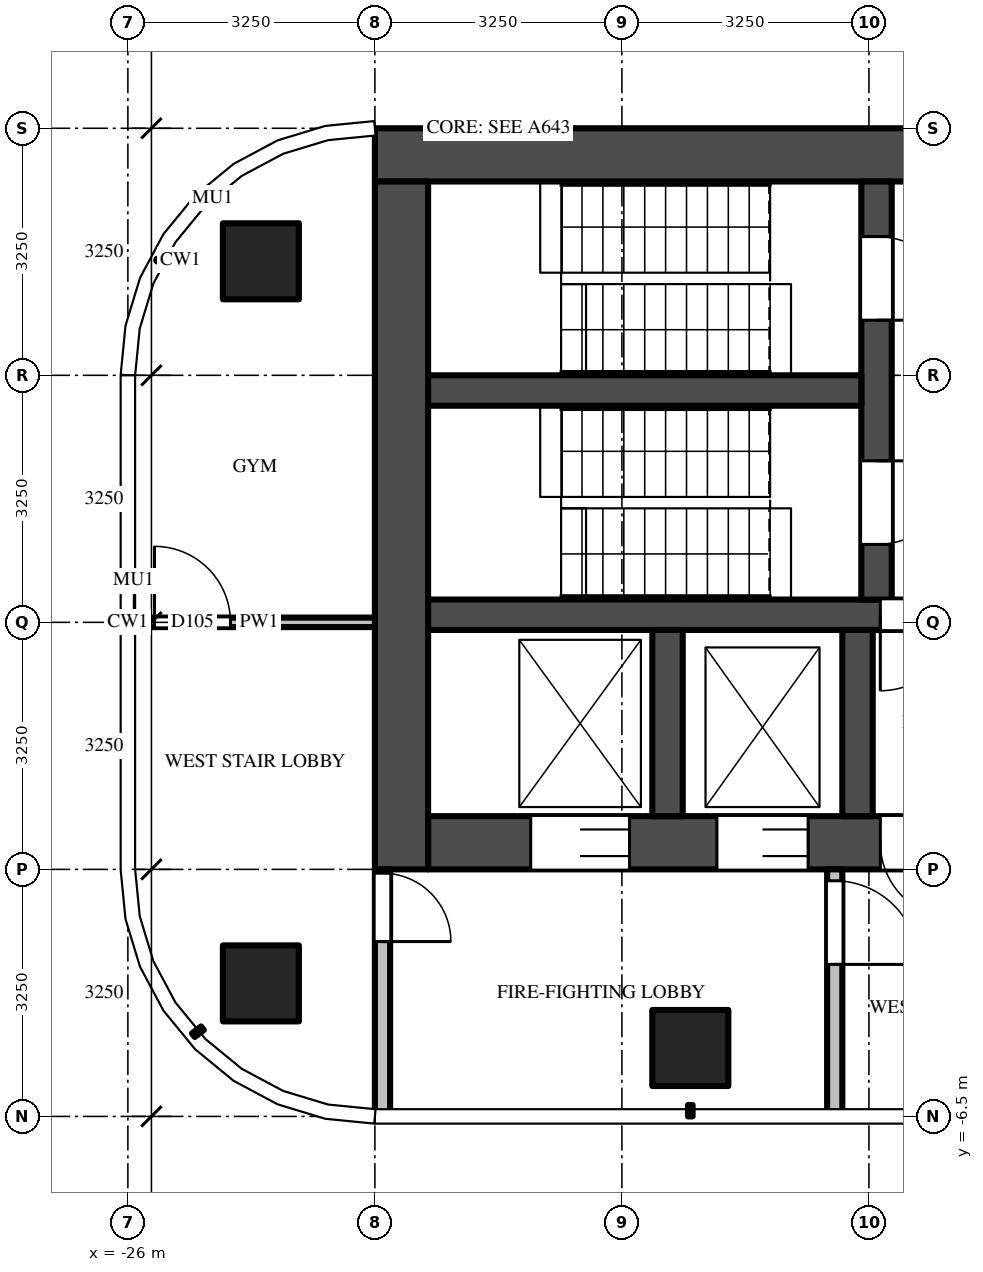
"""IFC4 building model, lengths in metres.
Left out: names, types, materials, properties, quantities, classifications, styles, units other than length and angle.
Written with IfcOpenShell. Run it as: python <this file> out.ifc"""

import sys

from ifc_helpers import new_model, si_unit, direction, frame, frame_2d, origin, origin_2d, place, context, subcontext, project, spatial, polyline, rectangle, outline, extrude, source, transform, mapped, element, fill, save


model = new_model("IFC4")
c1 = context("Model", 3, precision=1e-05, world=origin(), true_north=direction((0.0, 1.0)))
c2 = subcontext(c1, "Body", "Model", "MODEL_VIEW")
j1 = project(units=[si_unit("LENGTHUNIT", "METRE"), si_unit("PLANEANGLEUNIT", "RADIAN")], contexts=[c1])
p1 = place(None, origin())
s1 = spatial("IfcSite", under=j1, at=p1, CompositionType="ELEMENT")
p2 = place(p1, origin())
s2 = spatial("IfcBuilding", under=s1, at=p2, CompositionType="ELEMENT")
p3 = place(p2, frame((0.0, 0.0, 326.2)))
s3 = spatial("IfcBuildingStorey", under=s2, at=p3, CompositionType="ELEMENT", Elevation=326.2)
m1 = source(origin(), c2, "Body", "SweptSolid", [
    extrude(rectangle(XDim=1.0, YDim=1.0, at=origin_2d()), origin(), (0.0, 0.0, 1.0), 3.9),
])
for number, where, z_axis, x_axis in (
    (1, (-18.6, -5.6, 0.0), (0.0, 0.0, 1.0), (1.0, 0.0, 0.0)),
    (2, (-24.25, -4.75, 0.0), (0.0, 0.0, 1.0), (1.0, 0.0, 0.0)),
    (3, (-24.25, 4.75, 0.0), (0.0, 0.0, 1.0), (1.0, 0.0, 0.0)),
):
    element("IfcColumn", number, at=place(p3, frame(where, z_axis=z_axis, x_axis=x_axis)), inside=s3, PredefinedType="COLUMN", context=c2, shape_type="MappedRepresentation", body=[
        mapped(m1, transform((0.0, 0.0, 0.0))),
    ])
m2 = source(origin(), c2, "Body", "SweptSolid", [
    extrude(rectangle(XDim=16.65, YDim=0.7, at=frame_2d((8.325, 0.0))), origin(), (0.0, 0.0, 1.0), 3.5),
])
p4 = place(p3, frame((-6.1, 6.15, 0.0), z_axis=(0.0, 0.0, 1.0), x_axis=(-1.0, 0.0, 0.0)))
e4 = element("IfcWall", 4, at=p4, inside=s3, PredefinedType="SHEAR", context=c2, shape_type="MappedRepresentation", body=[
    mapped(m2, transform((0.0, 0.0, 0.0))),
])
m3 = source(origin(), c2, "Body", "SweptSolid", [
    extrude(rectangle(XDim=14.85, YDim=0.7, at=frame_2d((7.425, 0.0))), origin(), (0.0, 0.0, 1.0), 3.5),
])
p5 = place(p3, frame((-7.2, -2.9, 0.0), z_axis=(0.0, 0.0, 1.0), x_axis=(-1.0, 0.0, 0.0)))
e5 = element("IfcWall", 5, at=p5, inside=s3, PredefinedType="SHEAR", context=c2, shape_type="MappedRepresentation", body=[
    mapped(m3, transform((0.0, 0.0, 0.0))),
])
m4 = source(origin(), c2, "Body", "SweptSolid", [
    extrude(rectangle(XDim=1.2, YDim=2.1, at=frame_2d((0.6, 1.05))), frame((0.0, 0.36, 0.0), z_axis=(0.0, -1.0, 0.0), x_axis=(1.0, 0.0, 0.0)), (0.0, 0.0, 1.0), 0.72),
])
p6 = place(p5, frame((5.7, 0.0, 0.0)))
e6 = element("IfcOpeningElement", 6, at=p6, cuts=e5, PredefinedType="OPENING", context=c2, shape_type="MappedRepresentation", body=[
    mapped(m4, transform((0.0, 0.0, 0.0))),
])
m5 = source(origin(), c2, "Body", "SweptSolid", [
    extrude(rectangle(XDim=1.3, YDim=2.1, at=frame_2d((0.65, 1.05))), frame((0.0, 0.36, 0.0), z_axis=(0.0, -1.0, 0.0), x_axis=(1.0, 0.0, 0.0)), (0.0, 0.0, 1.0), 0.72),
])
p7 = place(p5, frame((12.2, 0.0, 0.0)))
e7 = element("IfcOpeningElement", 7, at=p7, cuts=e5, PredefinedType="OPENING", context=c2, shape_type="MappedRepresentation", body=[
    mapped(m5, transform((0.0, 0.0, 0.0))),
])
p8 = place(p5, frame((9.85, 0.0, 0.0)))
e8 = element("IfcOpeningElement", 8, at=p8, cuts=e5, PredefinedType="OPENING", context=c2, shape_type="MappedRepresentation", body=[
    mapped(m4, transform((0.0, 0.0, 0.0))),
])
m6 = source(origin(), c2, "Body", "SweptSolid", [
    extrude(rectangle(XDim=1.0, YDim=2.1, at=frame_2d((0.5, 1.05))), frame((0.0, 0.36, 0.0), z_axis=(0.0, -1.0, 0.0), x_axis=(1.0, 0.0, 0.0)), (0.0, 0.0, 1.0), 0.72),
])
p9 = place(p5, frame((7.9, 0.0, 0.0)))
e9 = element("IfcOpeningElement", 9, at=p9, cuts=e5, PredefinedType="OPENING", context=c2, shape_type="MappedRepresentation", body=[
    mapped(m6, transform((0.0, 0.0, 0.0))),
])
p10 = place(p5, frame((1.212, 0.0, 0.0)))
e10 = element("IfcOpeningElement", 10, at=p10, cuts=e5, PredefinedType="OPENING", context=c2, shape_type="MappedRepresentation", body=[
    mapped(m6, transform((0.0, 0.0, 0.0))),
])
m7 = source(origin(), c2, "Body", "SweptSolid", [
    extrude(rectangle(XDim=0.8, YDim=2.1, at=frame_2d((0.4, 1.05))), frame((0.0, 0.36, 0.0), z_axis=(0.0, -1.0, 0.0), x_axis=(1.0, 0.0, 0.0)), (0.0, 0.0, 1.0), 0.72),
])
p11 = place(p5, frame((3.788, 0.0, 0.0)))
e11 = element("IfcOpeningElement", 11, at=p11, cuts=e5, PredefinedType="OPENING", context=c2, shape_type="MappedRepresentation", body=[
    mapped(m7, transform((0.0, 0.0, 0.0))),
])
m8 = source(origin(), c2, "Body", "SweptSolid", [
    extrude(rectangle(XDim=9.05, YDim=0.7, at=frame_2d((4.525, 0.0))), origin(), (0.0, 0.0, 1.0), 3.5),
])
p12 = place(p3, frame((-22.4, 5.8, 0.0), z_axis=(0.0, 0.0, 1.0), x_axis=(0.0, -1.0, 0.0)))
e12 = element("IfcWall", 12, at=p12, inside=s3, PredefinedType="SHEAR", context=c2, shape_type="MappedRepresentation", body=[
    mapped(m8, transform((0.0, 0.0, 0.0))),
])
m9 = source(origin(), c2, "Body", "SweptSolid", [
    extrude(rectangle(XDim=14.85, YDim=0.4, at=frame_2d((7.425, 0.0))), origin(), (0.0, 0.0, 1.0), 3.5),
])
p13 = place(p3, frame((-7.2, 0.1, 0.0), z_axis=(0.0, 0.0, 1.0), x_axis=(-1.0, 0.0, 0.0)))
e13 = element("IfcWall", 13, at=p13, inside=s3, PredefinedType="SHEAR", context=c2, shape_type="MappedRepresentation", body=[
    mapped(m9, transform((0.0, 0.0, 0.0))),
])
m10 = source(origin(), c2, "Body", "SweptSolid", [
    extrude(rectangle(XDim=1.0, YDim=2.1, at=frame_2d((0.5, 1.05))), frame((0.0, 0.21, 0.0), z_axis=(0.0, -1.0, 0.0), x_axis=(1.0, 0.0, 0.0)), (0.0, 0.0, 1.0), 0.42),
])
p14 = place(p13, frame((7.9, 0.0, 0.0)))
e14 = element("IfcOpeningElement", 14, at=p14, cuts=e13, PredefinedType="OPENING", context=c2, shape_type="MappedRepresentation", body=[
    mapped(m10, transform((0.0, 0.0, 0.0))),
])
m11 = source(origin(), c2, "Body", "SweptSolid", [
    extrude(rectangle(XDim=5.5, YDim=0.4, at=frame_2d((2.75, 0.0))), origin(), (0.0, 0.0, 1.0), 3.5),
])
p15 = place(p3, frame((-16.15, 5.8, 0.0), z_axis=(0.0, 0.0, 1.0), x_axis=(0.0, -1.0, 0.0)))
e15 = element("IfcWall", 15, at=p15, inside=s3, PredefinedType="SHEAR", context=c2, shape_type="MappedRepresentation", body=[
    mapped(m11, transform((0.0, 0.0, 0.0))),
])
m12 = source(origin(), c2, "Body", "SweptSolid", [
    extrude(rectangle(XDim=1.1, YDim=2.1, at=frame_2d((0.55, 1.05))), frame((0.0, 0.21, 0.0), z_axis=(0.0, -1.0, 0.0), x_axis=(1.0, 0.0, 0.0)), (0.0, 0.0, 1.0), 0.42),
])
p16 = place(p15, frame((0.725, 0.0, 0.0)))
e16 = element("IfcOpeningElement", 16, at=p16, cuts=e15, PredefinedType="OPENING", context=c2, shape_type="MappedRepresentation", body=[
    mapped(m12, transform((0.0, 0.0, 0.0))),
])
p17 = place(p15, frame((3.675, 0.0, 0.0)))
e17 = element("IfcOpeningElement", 17, at=p17, cuts=e15, PredefinedType="OPENING", context=c2, shape_type="MappedRepresentation", body=[
    mapped(m12, transform((0.0, 0.0, 0.0))),
])
m13 = source(origin(), c2, "Body", "SweptSolid", [
    extrude(rectangle(XDim=5.7, YDim=0.4, at=frame_2d((2.85, 0.0))), origin(), (0.0, 0.0, 1.0), 3.5),
])
p18 = place(p3, frame((-16.35, 3.05, 0.0), z_axis=(0.0, 0.0, 1.0), x_axis=(-1.0, 0.0, 0.0)))
e18 = element("IfcWall", 18, at=p18, inside=s3, PredefinedType="SHEAR", context=c2, shape_type="MappedRepresentation", body=[
    mapped(m13, transform((0.0, 0.0, 0.0))),
])
m14 = source(origin(), c2, "Body", "SweptSolid", [
    extrude(rectangle(XDim=2.45, YDim=0.4, at=frame_2d((1.225, 0.0))), origin(), (0.0, 0.0, 1.0), 3.5),
])
for number, where, z_axis, x_axis in (
    (19, (-16.4, -0.1, 0.0), (0.0, 0.0, 1.0), (0.0, -1.0, 0.0)),
    (20, (-18.9, -0.1, 0.0), (0.0, 0.0, 1.0), (0.0, -1.0, 0.0)),
):
    element("IfcWall", number, at=place(p3, frame(where, z_axis=z_axis, x_axis=x_axis)), inside=s3, PredefinedType="SHEAR", context=c2, shape_type="MappedRepresentation", body=[
        mapped(m14, transform((0.0, 0.0, 0.0))),
    ])
m15 = source(origin(), c2, "Body", "SweptSolid", [
    extrude(rectangle(XDim=3.25, YDim=0.2, at=frame_2d((1.625, 0.0))), origin(), (0.0, 0.0, 1.0), 3.5),
])
p19 = place(p3, frame((-16.7, -3.25, 0.0), z_axis=(0.0, 0.0, 1.0), x_axis=(0.0, -1.0, 0.0)))
e21 = element("IfcWall", 21, at=p19, inside=s3, PredefinedType="PARTITIONING", context=c2, shape_type="MappedRepresentation", body=[
    mapped(m15, transform((0.0, 0.0, 0.0))),
])
m16 = source(origin(), c2, "Body", "SweptSolid", [
    extrude(rectangle(XDim=1.1, YDim=2.1, at=frame_2d((0.55, 1.05))), frame((0.0, 0.11, 0.0), z_axis=(0.0, -1.0, 0.0), x_axis=(1.0, 0.0, 0.0)), (0.0, 0.0, 1.0), 0.22),
])
p20 = place(p19, frame((0.15, 0.0, 0.0)))
e22 = element("IfcOpeningElement", 22, at=p20, cuts=e21, PredefinedType="OPENING", context=c2, shape_type="MappedRepresentation", body=[
    mapped(m16, transform((0.0, 0.0, 0.0))),
])
p21 = place(p3, frame((-22.65, -3.25, 0.0), z_axis=(0.0, 0.0, 1.0), x_axis=(0.0, -1.0, 0.0)))
e23 = element("IfcWall", 23, at=p21, inside=s3, PredefinedType="PARTITIONING", context=c2, shape_type="MappedRepresentation", body=[
    mapped(m15, transform((0.0, 0.0, 0.0))),
])
m17 = source(origin(), c2, "Body", "SweptSolid", [
    extrude(rectangle(XDim=0.9, YDim=2.1, at=frame_2d((0.45, 1.05))), frame((0.0, 0.11, 0.0), z_axis=(0.0, -1.0, 0.0), x_axis=(1.0, 0.0, 0.0)), (0.0, 0.0, 1.0), 0.22),
])
p22 = place(p21, frame((0.05, 0.0, 0.0)))
e24 = element("IfcOpeningElement", 24, at=p22, cuts=e23, PredefinedType="OPENING", context=c2, shape_type="MappedRepresentation", body=[
    mapped(m17, transform((0.0, 0.0, 0.0))),
])
p23 = place(p3, origin())
e25 = element("IfcWall", 25, at=p23, inside=s3, PredefinedType="USERDEFINED", context=c2, shape_type="SweptSolid", body=[
    extrude(outline(polyline([(-25.364, -8.208), (-26.259, -7.39), (-25.854, -6.948), (-25.053, -7.68), (-23.654, -8.147), (-22.852, -8.101), (-22.817, -8.699), (-23.734, -8.753), (-25.364, -8.208)])), origin(), (0.0, 0.0, 1.0), 0.5),
])
m18 = source(origin(), c2, "Body", "SweptSolid", [
    extrude(rectangle(XDim=3.05, YDim=0.125, at=frame_2d((1.525, 0.0))), origin(), (0.0, 0.0, 1.0), 2.58),
])
p24 = place(p3, frame((-25.8, 0.0, 0.0), z_axis=(0.0, 0.0, 1.0), x_axis=(1.0, 0.0, 0.0)))
e26 = element("IfcWall", 26, at=p24, inside=s3, PredefinedType="PARTITIONING", context=c2, shape_type="MappedRepresentation", body=[
    mapped(m18, transform((0.0, 0.0, 0.0))),
])
m19 = source(origin(), c2, "Body", "SweptSolid", [
    extrude(rectangle(XDim=1.0, YDim=2.1, at=frame_2d((0.5, 1.05))), frame((0.0, 0.073, 0.0), z_axis=(0.0, -1.0, 0.0), x_axis=(1.0, 0.0, 0.0)), (0.0, 0.0, 1.0), 0.145),
])
p25 = place(p24, frame((0.15, 0.0, 0.0)))
e27 = element("IfcOpeningElement", 27, at=p25, cuts=e26, PredefinedType="OPENING", context=c2, shape_type="MappedRepresentation", body=[
    mapped(m19, transform((0.0, 0.0, 0.0))),
])
m20 = source(origin(), c2, "Body", "SweptSolid", [
    extrude(rectangle(XDim=1.3, YDim=2.1, at=frame_2d((0.65, 1.05))), frame((0.0, -0.275, 0.0), z_axis=(0.0, -1.0, 0.0), x_axis=(1.0, 0.0, 0.0)), (0.0, 0.0, 1.0), 0.05),
])
p26 = place(p7, origin())
e28 = element("IfcDoor", 28, at=p26, inside=s3, OperationType="DOUBLE_DOOR_SLIDING", PredefinedType="DOOR", context=c2, shape_type="MappedRepresentation", body=[
    mapped(m20, transform((0.0, 0.0, 0.0))),
])
fill(e7, e28)
m21 = source(origin(), c2, "Body", "SweptSolid", [
    extrude(rectangle(XDim=1.2, YDim=2.1, at=frame_2d((0.6, 1.05))), frame((0.0, -0.275, 0.0), z_axis=(0.0, -1.0, 0.0), x_axis=(1.0, 0.0, 0.0)), (0.0, 0.0, 1.0), 0.05),
])
p27 = place(p8, origin())
e29 = element("IfcDoor", 29, at=p27, inside=s3, OperationType="DOUBLE_DOOR_SLIDING", PredefinedType="DOOR", context=c2, shape_type="MappedRepresentation", body=[
    mapped(m21, transform((0.0, 0.0, 0.0))),
])
fill(e8, e29)
m22 = source(origin(), c2, "Body", "SweptSolid", [
    extrude(rectangle(XDim=1.1, YDim=2.1, at=frame_2d((0.55, 1.05))), frame((0.0, 0.025, 0.0), z_axis=(0.0, -1.0, 0.0), x_axis=(1.0, 0.0, 0.0)), (0.0, 0.0, 1.0), 0.05),
])
p28 = place(p16, origin())
e30 = element("IfcDoor", 30, at=p28, inside=s3, OperationType="SINGLE_SWING_RIGHT", PredefinedType="DOOR", context=c2, shape_type="MappedRepresentation", body=[
    mapped(m22, transform((0.0, 0.0, 0.0))),
])
fill(e16, e30)
p29 = place(p17, origin())
e31 = element("IfcDoor", 31, at=p29, inside=s3, OperationType="SINGLE_SWING_LEFT", PredefinedType="DOOR", context=c2, shape_type="MappedRepresentation", body=[
    mapped(m22, transform((0.0, 0.0, 0.0))),
])
fill(e17, e31)
m23 = source(origin(), c2, "Body", "SweptSolid", [
    extrude(rectangle(XDim=1.0, YDim=2.1, at=frame_2d((0.5, 1.05))), frame((0.0, 0.025, 0.0), z_axis=(0.0, -1.0, 0.0), x_axis=(1.0, 0.0, 0.0)), (0.0, 0.0, 1.0), 0.05),
])
p30 = place(p14, origin())
e32 = element("IfcDoor", 32, at=p30, inside=s3, OperationType="SINGLE_SWING_RIGHT", PredefinedType="DOOR", context=c2, shape_type="MappedRepresentation", body=[
    mapped(m23, transform((0.0, 0.0, 0.0))),
])
fill(e14, e32)
m24 = source(origin(), c2, "Body", "SweptSolid", [
    extrude(rectangle(XDim=1.0, YDim=2.1, at=frame_2d((0.5, 1.05))), frame((0.0, -0.275, 0.0), z_axis=(0.0, -1.0, 0.0), x_axis=(1.0, 0.0, 0.0)), (0.0, 0.0, 1.0), 0.05),
])
p31 = place(p9, origin())
e33 = element("IfcDoor", 33, at=p31, inside=s3, OperationType="SINGLE_SWING_LEFT", PredefinedType="DOOR", context=c2, shape_type="MappedRepresentation", body=[
    mapped(m24, transform((0.0, 0.0, 0.0))),
])
fill(e9, e33)
p32 = place(p20, origin())
e34 = element("IfcDoor", 34, at=p32, inside=s3, OperationType="SINGLE_SWING_RIGHT", PredefinedType="DOOR", context=c2, shape_type="MappedRepresentation", body=[
    mapped(m22, transform((0.0, 0.0, 0.0))),
])
fill(e22, e34)
m25 = source(origin(), c2, "Body", "SweptSolid", [
    extrude(rectangle(XDim=0.9, YDim=2.1, at=frame_2d((0.45, 1.05))), frame((0.0, 0.025, 0.0), z_axis=(0.0, -1.0, 0.0), x_axis=(1.0, 0.0, 0.0)), (0.0, 0.0, 1.0), 0.05),
])
p33 = place(p22, origin())
e35 = element("IfcDoor", 35, at=p33, inside=s3, OperationType="SINGLE_SWING_RIGHT", PredefinedType="DOOR", context=c2, shape_type="MappedRepresentation", body=[
    mapped(m25, transform((0.0, 0.0, 0.0))),
])
fill(e24, e35)
p34 = place(p25, origin())
e36 = element("IfcDoor", 36, at=p34, inside=s3, OperationType="SINGLE_SWING_LEFT", PredefinedType="DOOR", context=c2, shape_type="MappedRepresentation", body=[
    mapped(m23, transform((0.0, 0.0, 0.0))),
])
fill(e27, e36)
save(model, sys.argv[1])
